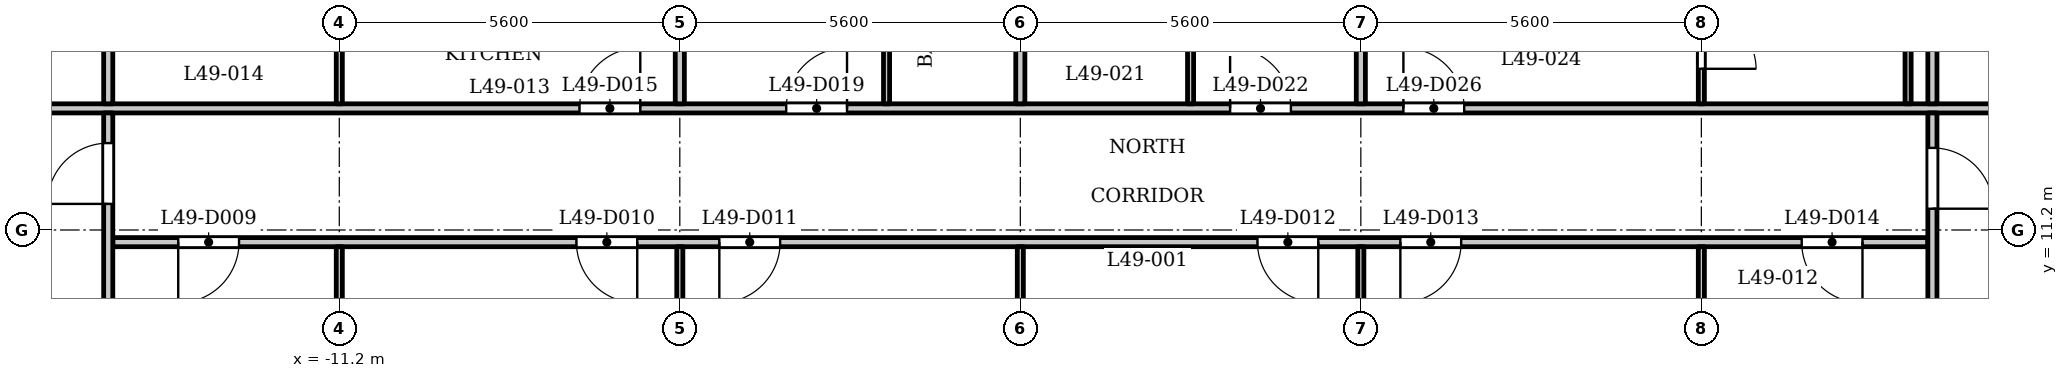
"""IFC4 building model, lengths in metres.
Left out: names, types, materials, properties, quantities, classifications, styles, units other than length and angle.
Written with IfcOpenShell. Run it as: python <this file> out.ifc"""

import sys

from ifc_helpers import new_model, si_unit, direction, frame, frame_2d, origin, place, context, subcontext, project, spatial, rectangle, extrude, element, fill, save


model = new_model("IFC4")
c1 = context("Model", 3, precision=1e-05, world=origin(), true_north=direction((0.0, 1.0)))
c2 = subcontext(c1, "Body", "Model", "MODEL_VIEW")
j1 = project(units=[si_unit("LENGTHUNIT", "METRE"), si_unit("PLANEANGLEUNIT", "RADIAN")], contexts=[c1])
p1 = place(None, origin())
s1 = spatial("IfcSite", under=j1, at=p1, CompositionType="ELEMENT")
p2 = place(p1, origin())
s2 = spatial("IfcBuilding", under=s1, at=p2, CompositionType="ELEMENT")
p3 = place(p2, frame((0.0, 0.0, 192.4)))
s3 = spatial("IfcBuildingStorey", under=s2, at=p3, CompositionType="ELEMENT", Elevation=192.4)
p4 = place(p3, frame((-14.925, 11.0, 0.0), z_axis=(0.0, 0.0, 1.0), x_axis=(1.0, 0.0, 0.0)))
e1 = element("IfcWall", 1, at=p4, inside=s3, PredefinedType="PARTITIONING", context=c2, shape_type="SweptSolid", body=[
    extrude(rectangle(XDim=29.85, YDim=0.15, at=frame_2d((14.925, 0.0))), origin(), (0.0, 0.0, 1.0), 3.2),
])
p5 = place(p4, frame((1.076, 0.0, 0.0)))
e2 = element("IfcOpeningElement", 2, at=p5, cuts=e1, PredefinedType="OPENING", context=c2, shape_type="SweptSolid", body=[
    extrude(rectangle(XDim=1.0, YDim=2.1, at=frame_2d((0.5, 1.05))), frame((0.0, 0.085, 0.0), z_axis=(0.0, -1.0, 0.0), x_axis=(1.0, 0.0, 0.0)), (0.0, 0.0, 1.0), 0.17),
])
p6 = place(p4, frame((7.625, 0.0, 0.0)))
e3 = element("IfcOpeningElement", 3, at=p6, cuts=e1, PredefinedType="OPENING", context=c2, shape_type="SweptSolid", body=[
    extrude(rectangle(XDim=1.0, YDim=2.1, at=frame_2d((0.5, 1.05))), frame((0.0, 0.085, 0.0), z_axis=(0.0, -1.0, 0.0), x_axis=(1.0, 0.0, 0.0)), (0.0, 0.0, 1.0), 0.17),
])
p7 = place(p4, frame((9.975, 0.0, 0.0)))
e4 = element("IfcOpeningElement", 4, at=p7, cuts=e1, PredefinedType="OPENING", context=c2, shape_type="SweptSolid", body=[
    extrude(rectangle(XDim=1.0, YDim=2.1, at=frame_2d((0.5, 1.05))), frame((0.0, 0.085, 0.0), z_axis=(0.0, -1.0, 0.0), x_axis=(1.0, 0.0, 0.0)), (0.0, 0.0, 1.0), 0.17),
])
p8 = place(p4, frame((18.825, 0.0, 0.0)))
e5 = element("IfcOpeningElement", 5, at=p8, cuts=e1, PredefinedType="OPENING", context=c2, shape_type="SweptSolid", body=[
    extrude(rectangle(XDim=1.0, YDim=2.1, at=frame_2d((0.5, 1.05))), frame((0.0, 0.085, 0.0), z_axis=(0.0, -1.0, 0.0), x_axis=(1.0, 0.0, 0.0)), (0.0, 0.0, 1.0), 0.17),
])
p9 = place(p4, frame((21.175, 0.0, 0.0)))
e6 = element("IfcOpeningElement", 6, at=p9, cuts=e1, PredefinedType="OPENING", context=c2, shape_type="SweptSolid", body=[
    extrude(rectangle(XDim=1.0, YDim=2.1, at=frame_2d((0.5, 1.05))), frame((0.0, 0.085, 0.0), z_axis=(0.0, -1.0, 0.0), x_axis=(1.0, 0.0, 0.0)), (0.0, 0.0, 1.0), 0.17),
])
p10 = place(p4, frame((27.775, 0.0, 0.0)))
e7 = element("IfcOpeningElement", 7, at=p10, cuts=e1, PredefinedType="OPENING", context=c2, shape_type="SweptSolid", body=[
    extrude(rectangle(XDim=1.0, YDim=2.1, at=frame_2d((0.5, 1.05))), frame((0.0, 0.085, 0.0), z_axis=(0.0, -1.0, 0.0), x_axis=(1.0, 0.0, 0.0)), (0.0, 0.0, 1.0), 0.17),
])
p11 = place(p3, frame((-17.4, 13.2, 0.0), z_axis=(0.0, 0.0, 1.0), x_axis=(1.0, 0.0, 0.0)))
e8 = element("IfcWall", 8, at=p11, inside=s3, PredefinedType="PARTITIONING", context=c2, shape_type="SweptSolid", body=[
    extrude(rectangle(XDim=34.8, YDim=0.15, at=frame_2d((17.4, 0.0))), origin(), (0.0, 0.0, 1.0), 3.2),
])
p12 = place(p11, frame((0.25, 0.0, 0.0)))
e9 = element("IfcOpeningElement", 9, at=p12, cuts=e8, PredefinedType="OPENING", context=c2, shape_type="SweptSolid", body=[
    extrude(rectangle(XDim=1.0, YDim=2.1, at=frame_2d((0.5, 1.05))), frame((0.0, 0.085, 0.0), z_axis=(0.0, -1.0, 0.0), x_axis=(1.0, 0.0, 0.0)), (0.0, 0.0, 1.0), 0.17),
])
p13 = place(p11, frame((33.65, 0.0, 0.0)))
e10 = element("IfcOpeningElement", 10, at=p13, cuts=e8, PredefinedType="OPENING", context=c2, shape_type="SweptSolid", body=[
    extrude(rectangle(XDim=1.0, YDim=2.1, at=frame_2d((0.5, 1.05))), frame((0.0, 0.085, 0.0), z_axis=(0.0, -1.0, 0.0), x_axis=(1.0, 0.0, 0.0)), (0.0, 0.0, 1.0), 0.17),
])
p14 = place(p11, frame((10.15, 0.0, 0.0)))
e11 = element("IfcOpeningElement", 11, at=p14, cuts=e8, PredefinedType="OPENING", context=c2, shape_type="SweptSolid", body=[
    extrude(rectangle(XDim=1.0, YDim=2.1, at=frame_2d((0.5, 1.05))), frame((0.0, 0.085, 0.0), z_axis=(0.0, -1.0, 0.0), x_axis=(1.0, 0.0, 0.0)), (0.0, 0.0, 1.0), 0.17),
])
p15 = place(p11, frame((13.55, 0.0, 0.0)))
e12 = element("IfcOpeningElement", 12, at=p15, cuts=e8, PredefinedType="OPENING", context=c2, shape_type="SweptSolid", body=[
    extrude(rectangle(XDim=1.0, YDim=2.1, at=frame_2d((0.5, 1.05))), frame((0.0, 0.085, 0.0), z_axis=(0.0, -1.0, 0.0), x_axis=(1.0, 0.0, 0.0)), (0.0, 0.0, 1.0), 0.17),
])
p16 = place(p11, frame((20.85, 0.0, 0.0)))
e13 = element("IfcOpeningElement", 13, at=p16, cuts=e8, PredefinedType="OPENING", context=c2, shape_type="SweptSolid", body=[
    extrude(rectangle(XDim=1.0, YDim=2.1, at=frame_2d((0.5, 1.05))), frame((0.0, 0.085, 0.0), z_axis=(0.0, -1.0, 0.0), x_axis=(1.0, 0.0, 0.0)), (0.0, 0.0, 1.0), 0.17),
])
p17 = place(p11, frame((23.7, 0.0, 0.0)))
e14 = element("IfcOpeningElement", 14, at=p17, cuts=e8, PredefinedType="OPENING", context=c2, shape_type="SweptSolid", body=[
    extrude(rectangle(XDim=1.0, YDim=2.1, at=frame_2d((0.5, 1.05))), frame((0.0, 0.085, 0.0), z_axis=(0.0, -1.0, 0.0), x_axis=(1.0, 0.0, 0.0)), (0.0, 0.0, 1.0), 0.17),
])
p18 = place(p3, frame((-15.0, 6.769, 0.0), z_axis=(0.0, 0.0, 1.0), x_axis=(0.0, 1.0, 0.0)))
e15 = element("IfcWall", 15, at=p18, inside=s3, PredefinedType="PARTITIONING", context=c2, shape_type="SweptSolid", body=[
    extrude(rectangle(XDim=6.356, YDim=0.15, at=frame_2d((3.178, 0.0))), origin(), (0.0, 0.0, 1.0), 3.2),
])
p19 = place(p18, frame((4.86, 0.0, 0.0)))
e16 = element("IfcOpeningElement", 16, at=p19, cuts=e15, PredefinedType="OPENING", context=c2, shape_type="SweptSolid", body=[
    extrude(rectangle(XDim=1.0, YDim=2.1, at=frame_2d((0.5, 1.05))), frame((0.0, 0.085, 0.0), z_axis=(0.0, -1.0, 0.0), x_axis=(1.0, 0.0, 0.0)), (0.0, 0.0, 1.0), 0.17),
])
p20 = place(p3, frame((-15.0, 13.275, 0.0), z_axis=(0.0, 0.0, 1.0), x_axis=(0.0, 1.0, 0.0)))
e17 = element("IfcWall", 17, at=p20, inside=s3, PredefinedType="PARTITIONING", context=c2, shape_type="SweptSolid", body=[
    extrude(rectangle(XDim=2.05, YDim=0.15, at=frame_2d((1.025, 0.0))), origin(), (0.0, 0.0, 1.0), 3.2),
])
p21 = place(p3, frame((-11.2, 7.32, 0.0), z_axis=(0.0, 0.0, 1.0), x_axis=(0.0, 1.0, 0.0)))
e18 = element("IfcWall", 18, at=p21, inside=s3, PredefinedType="PARTITIONING", context=c2, shape_type="SweptSolid", body=[
    extrude(rectangle(XDim=3.605, YDim=0.1, at=frame_2d((1.802, 0.0))), origin(), (0.0, 0.0, 1.0), 3.2),
])
p22 = place(p3, frame((-11.2, 13.275, 0.0), z_axis=(0.0, 0.0, 1.0), x_axis=(0.0, 1.0, 0.0)))
e19 = element("IfcWall", 19, at=p22, inside=s3, PredefinedType="PARTITIONING", context=c2, shape_type="SweptSolid", body=[
    extrude(rectangle(XDim=3.775, YDim=0.1, at=frame_2d((1.888, 0.0))), origin(), (0.0, 0.0, 1.0), 3.2),
])
p23 = place(p3, frame((-5.6, 7.32, 0.0), z_axis=(0.0, 0.0, 1.0), x_axis=(0.0, 1.0, 0.0)))
e20 = element("IfcWall", 20, at=p23, inside=s3, PredefinedType="PARTITIONING", context=c2, shape_type="SweptSolid", body=[
    extrude(rectangle(XDim=3.605, YDim=0.1, at=frame_2d((1.802, 0.0))), origin(), (0.0, 0.0, 1.0), 3.2),
])
p24 = place(p3, frame((-5.6, 13.275, 0.0), z_axis=(0.0, 0.0, 1.0), x_axis=(0.0, 1.0, 0.0)))
e21 = element("IfcWall", 21, at=p24, inside=s3, PredefinedType="PARTITIONING", context=c2, shape_type="SweptSolid", body=[
    extrude(rectangle(XDim=3.775, YDim=0.15, at=frame_2d((1.888, 0.0))), origin(), (0.0, 0.0, 1.0), 3.2),
])
p25 = place(p3, frame((-2.2, 13.275, 0.0), z_axis=(0.0, 0.0, 1.0), x_axis=(0.0, 1.0, 0.0)))
e22 = element("IfcWall", 22, at=p25, inside=s3, PredefinedType="PARTITIONING", context=c2, shape_type="SweptSolid", body=[
    extrude(rectangle(XDim=3.775, YDim=0.1, at=frame_2d((1.888, 0.0))), origin(), (0.0, 0.0, 1.0), 3.2),
])
p26 = place(p3, frame((0.0, 7.32, 0.0), z_axis=(0.0, 0.0, 1.0), x_axis=(0.0, 1.0, 0.0)))
e23 = element("IfcWall", 23, at=p26, inside=s3, PredefinedType="PARTITIONING", context=c2, shape_type="SweptSolid", body=[
    extrude(rectangle(XDim=3.605, YDim=0.1, at=frame_2d((1.802, 0.0))), origin(), (0.0, 0.0, 1.0), 3.2),
])
p27 = place(p3, frame((0.0, 13.275, 0.0), z_axis=(0.0, 0.0, 1.0), x_axis=(0.0, 1.0, 0.0)))
e24 = element("IfcWall", 24, at=p27, inside=s3, PredefinedType="PARTITIONING", context=c2, shape_type="SweptSolid", body=[
    extrude(rectangle(XDim=3.775, YDim=0.15, at=frame_2d((1.888, 0.0))), origin(), (0.0, 0.0, 1.0), 3.2),
])
p28 = place(p3, frame((2.8, 13.275, 0.0), z_axis=(0.0, 0.0, 1.0), x_axis=(0.0, 1.0, 0.0)))
e25 = element("IfcWall", 25, at=p28, inside=s3, PredefinedType="PARTITIONING", context=c2, shape_type="SweptSolid", body=[
    extrude(rectangle(XDim=3.775, YDim=0.1, at=frame_2d((1.888, 0.0))), origin(), (0.0, 0.0, 1.0), 3.2),
])
p29 = place(p3, frame((5.6, 7.32, 0.0), z_axis=(0.0, 0.0, 1.0), x_axis=(0.0, 1.0, 0.0)))
e26 = element("IfcWall", 26, at=p29, inside=s3, PredefinedType="PARTITIONING", context=c2, shape_type="SweptSolid", body=[
    extrude(rectangle(XDim=3.605, YDim=0.1, at=frame_2d((1.802, 0.0))), origin(), (0.0, 0.0, 1.0), 3.2),
])
p30 = place(p3, frame((5.6, 13.275, 0.0), z_axis=(0.0, 0.0, 1.0), x_axis=(0.0, 1.0, 0.0)))
e27 = element("IfcWall", 27, at=p30, inside=s3, PredefinedType="PARTITIONING", context=c2, shape_type="SweptSolid", body=[
    extrude(rectangle(XDim=3.775, YDim=0.15, at=frame_2d((1.888, 0.0))), origin(), (0.0, 0.0, 1.0), 3.2),
])
p31 = place(p3, frame((11.2, 7.32, 0.0), z_axis=(0.0, 0.0, 1.0), x_axis=(0.0, 1.0, 0.0)))
e28 = element("IfcWall", 28, at=p31, inside=s3, PredefinedType="PARTITIONING", context=c2, shape_type="SweptSolid", body=[
    extrude(rectangle(XDim=3.605, YDim=0.1, at=frame_2d((1.802, 0.0))), origin(), (0.0, 0.0, 1.0), 3.2),
])
p32 = place(p3, frame((11.2, 13.275, 0.0), z_axis=(0.0, 0.0, 1.0), x_axis=(0.0, 1.0, 0.0)))
e29 = element("IfcWall", 29, at=p32, inside=s3, PredefinedType="PARTITIONING", context=c2, shape_type="SweptSolid", body=[
    extrude(rectangle(XDim=3.775, YDim=0.1, at=frame_2d((1.888, 0.0))), origin(), (0.0, 0.0, 1.0), 3.2),
])
p33 = place(p32, frame((0.576, 0.0, 0.0)))
e30 = element("IfcOpeningElement", 30, at=p33, cuts=e29, PredefinedType="OPENING", context=c2, shape_type="SweptSolid", body=[
    extrude(rectangle(XDim=0.9, YDim=2.1, at=frame_2d((0.45, 1.05))), frame((0.0, 0.06, 0.0), z_axis=(0.0, -1.0, 0.0), x_axis=(1.0, 0.0, 0.0)), (0.0, 0.0, 1.0), 0.12),
])
p34 = place(p3, frame((14.6, 13.275, 0.0), z_axis=(0.0, 0.0, 1.0), x_axis=(0.0, 1.0, 0.0)))
e31 = element("IfcWall", 31, at=p34, inside=s3, PredefinedType="PARTITIONING", context=c2, shape_type="SweptSolid", body=[
    extrude(rectangle(XDim=3.775, YDim=0.1, at=frame_2d((1.888, 0.0))), origin(), (0.0, 0.0, 1.0), 3.2),
])
p35 = place(p3, frame((15.0, 6.769, 0.0), z_axis=(0.0, 0.0, 1.0), x_axis=(0.0, 1.0, 0.0)))
e32 = element("IfcWall", 32, at=p35, inside=s3, PredefinedType="PARTITIONING", context=c2, shape_type="SweptSolid", body=[
    extrude(rectangle(XDim=6.356, YDim=0.15, at=frame_2d((3.178, 0.0))), origin(), (0.0, 0.0, 1.0), 3.2),
])
p36 = place(p35, frame((4.781, 0.0, 0.0)))
e33 = element("IfcOpeningElement", 33, at=p36, cuts=e32, PredefinedType="OPENING", context=c2, shape_type="SweptSolid", body=[
    extrude(rectangle(XDim=1.0, YDim=2.1, at=frame_2d((0.5, 1.05))), frame((0.0, 0.085, 0.0), z_axis=(0.0, -1.0, 0.0), x_axis=(1.0, 0.0, 0.0)), (0.0, 0.0, 1.0), 0.17),
])
p37 = place(p3, frame((15.0, 13.275, 0.0), z_axis=(0.0, 0.0, 1.0), x_axis=(0.0, 1.0, 0.0)))
e34 = element("IfcWall", 34, at=p37, inside=s3, PredefinedType="PARTITIONING", context=c2, shape_type="SweptSolid", body=[
    extrude(rectangle(XDim=2.05, YDim=0.15, at=frame_2d((1.025, 0.0))), origin(), (0.0, 0.0, 1.0), 3.2),
])
p38 = place(p19, origin())
e35 = element("IfcDoor", 35, at=p38, inside=s3, OperationType="SINGLE_SWING_RIGHT", PredefinedType="DOOR", context=c2, shape_type="SweptSolid", body=[
    extrude(rectangle(XDim=1.0, YDim=2.1, at=frame_2d((0.5, 1.05))), frame((0.0, 0.025, 0.0), z_axis=(0.0, -1.0, 0.0), x_axis=(1.0, 0.0, 0.0)), (0.0, 0.0, 1.0), 0.05),
])
fill(e16, e35)
p39 = place(p36, origin())
e36 = element("IfcDoor", 36, at=p39, inside=s3, OperationType="SINGLE_SWING_LEFT", PredefinedType="DOOR", context=c2, shape_type="SweptSolid", body=[
    extrude(rectangle(XDim=1.0, YDim=2.1, at=frame_2d((0.5, 1.05))), frame((0.0, 0.025, 0.0), z_axis=(0.0, -1.0, 0.0), x_axis=(1.0, 0.0, 0.0)), (0.0, 0.0, 1.0), 0.05),
])
fill(e33, e36)
p40 = place(p5, origin())
e37 = element("IfcDoor", 37, at=p40, inside=s3, OperationType="SINGLE_SWING_LEFT", PredefinedType="DOOR", context=c2, shape_type="SweptSolid", body=[
    extrude(rectangle(XDim=1.0, YDim=2.1, at=frame_2d((0.5, 1.05))), frame((0.0, 0.025, 0.0), z_axis=(0.0, -1.0, 0.0), x_axis=(1.0, 0.0, 0.0)), (0.0, 0.0, 1.0), 0.05),
])
fill(e2, e37)
p41 = place(p6, origin())
e38 = element("IfcDoor", 38, at=p41, inside=s3, OperationType="SINGLE_SWING_RIGHT", PredefinedType="DOOR", context=c2, shape_type="SweptSolid", body=[
    extrude(rectangle(XDim=1.0, YDim=2.1, at=frame_2d((0.5, 1.05))), frame((0.0, 0.025, 0.0), z_axis=(0.0, -1.0, 0.0), x_axis=(1.0, 0.0, 0.0)), (0.0, 0.0, 1.0), 0.05),
])
fill(e3, e38)
p42 = place(p7, origin())
e39 = element("IfcDoor", 39, at=p42, inside=s3, OperationType="SINGLE_SWING_LEFT", PredefinedType="DOOR", context=c2, shape_type="SweptSolid", body=[
    extrude(rectangle(XDim=1.0, YDim=2.1, at=frame_2d((0.5, 1.05))), frame((0.0, 0.025, 0.0), z_axis=(0.0, -1.0, 0.0), x_axis=(1.0, 0.0, 0.0)), (0.0, 0.0, 1.0), 0.05),
])
fill(e4, e39)
p43 = place(p8, origin())
e40 = element("IfcDoor", 40, at=p43, inside=s3, OperationType="SINGLE_SWING_RIGHT", PredefinedType="DOOR", context=c2, shape_type="SweptSolid", body=[
    extrude(rectangle(XDim=1.0, YDim=2.1, at=frame_2d((0.5, 1.05))), frame((0.0, 0.025, 0.0), z_axis=(0.0, -1.0, 0.0), x_axis=(1.0, 0.0, 0.0)), (0.0, 0.0, 1.0), 0.05),
])
fill(e5, e40)
p44 = place(p9, origin())
e41 = element("IfcDoor", 41, at=p44, inside=s3, OperationType="SINGLE_SWING_LEFT", PredefinedType="DOOR", context=c2, shape_type="SweptSolid", body=[
    extrude(rectangle(XDim=1.0, YDim=2.1, at=frame_2d((0.5, 1.05))), frame((0.0, 0.025, 0.0), z_axis=(0.0, -1.0, 0.0), x_axis=(1.0, 0.0, 0.0)), (0.0, 0.0, 1.0), 0.05),
])
fill(e6, e41)
p45 = place(p10, origin())
e42 = element("IfcDoor", 42, at=p45, inside=s3, OperationType="SINGLE_SWING_RIGHT", PredefinedType="DOOR", context=c2, shape_type="SweptSolid", body=[
    extrude(rectangle(XDim=1.0, YDim=2.1, at=frame_2d((0.5, 1.05))), frame((0.0, 0.025, 0.0), z_axis=(0.0, -1.0, 0.0), x_axis=(1.0, 0.0, 0.0)), (0.0, 0.0, 1.0), 0.05),
])
fill(e7, e42)
p46 = place(p14, origin())
e43 = element("IfcDoor", 43, at=p46, inside=s3, OperationType="SINGLE_SWING_LEFT", PredefinedType="DOOR", context=c2, shape_type="SweptSolid", body=[
    extrude(rectangle(XDim=1.0, YDim=2.1, at=frame_2d((0.5, 1.05))), frame((0.0, 0.025, 0.0), z_axis=(0.0, -1.0, 0.0), x_axis=(1.0, 0.0, 0.0)), (0.0, 0.0, 1.0), 0.05),
])
fill(e11, e43)
p47 = place(p15, origin())
e44 = element("IfcDoor", 44, at=p47, inside=s3, OperationType="SINGLE_SWING_LEFT", PredefinedType="DOOR", context=c2, shape_type="SweptSolid", body=[
    extrude(rectangle(XDim=1.0, YDim=2.1, at=frame_2d((0.5, 1.05))), frame((0.0, 0.025, 0.0), z_axis=(0.0, -1.0, 0.0), x_axis=(1.0, 0.0, 0.0)), (0.0, 0.0, 1.0), 0.05),
])
fill(e12, e44)
p48 = place(p16, origin())
e45 = element("IfcDoor", 45, at=p48, inside=s3, OperationType="SINGLE_SWING_RIGHT", PredefinedType="DOOR", context=c2, shape_type="SweptSolid", body=[
    extrude(rectangle(XDim=1.0, YDim=2.1, at=frame_2d((0.5, 1.05))), frame((0.0, 0.025, 0.0), z_axis=(0.0, -1.0, 0.0), x_axis=(1.0, 0.0, 0.0)), (0.0, 0.0, 1.0), 0.05),
])
fill(e13, e45)
p49 = place(p17, origin())
e46 = element("IfcDoor", 46, at=p49, inside=s3, OperationType="SINGLE_SWING_RIGHT", PredefinedType="DOOR", context=c2, shape_type="SweptSolid", body=[
    extrude(rectangle(XDim=1.0, YDim=2.1, at=frame_2d((0.5, 1.05))), frame((0.0, 0.025, 0.0), z_axis=(0.0, -1.0, 0.0), x_axis=(1.0, 0.0, 0.0)), (0.0, 0.0, 1.0), 0.05),
])
fill(e14, e46)
p50 = place(p33, origin())
e47 = element("IfcDoor", 47, at=p50, inside=s3, OperationType="SINGLE_SWING_LEFT", PredefinedType="DOOR", context=c2, shape_type="SweptSolid", body=[
    extrude(rectangle(XDim=0.9, YDim=2.1, at=frame_2d((0.45, 1.05))), frame((0.0, 0.025, 0.0), z_axis=(0.0, -1.0, 0.0), x_axis=(1.0, 0.0, 0.0)), (0.0, 0.0, 1.0), 0.05),
])
fill(e30, e47)
save(model, sys.argv[1])
